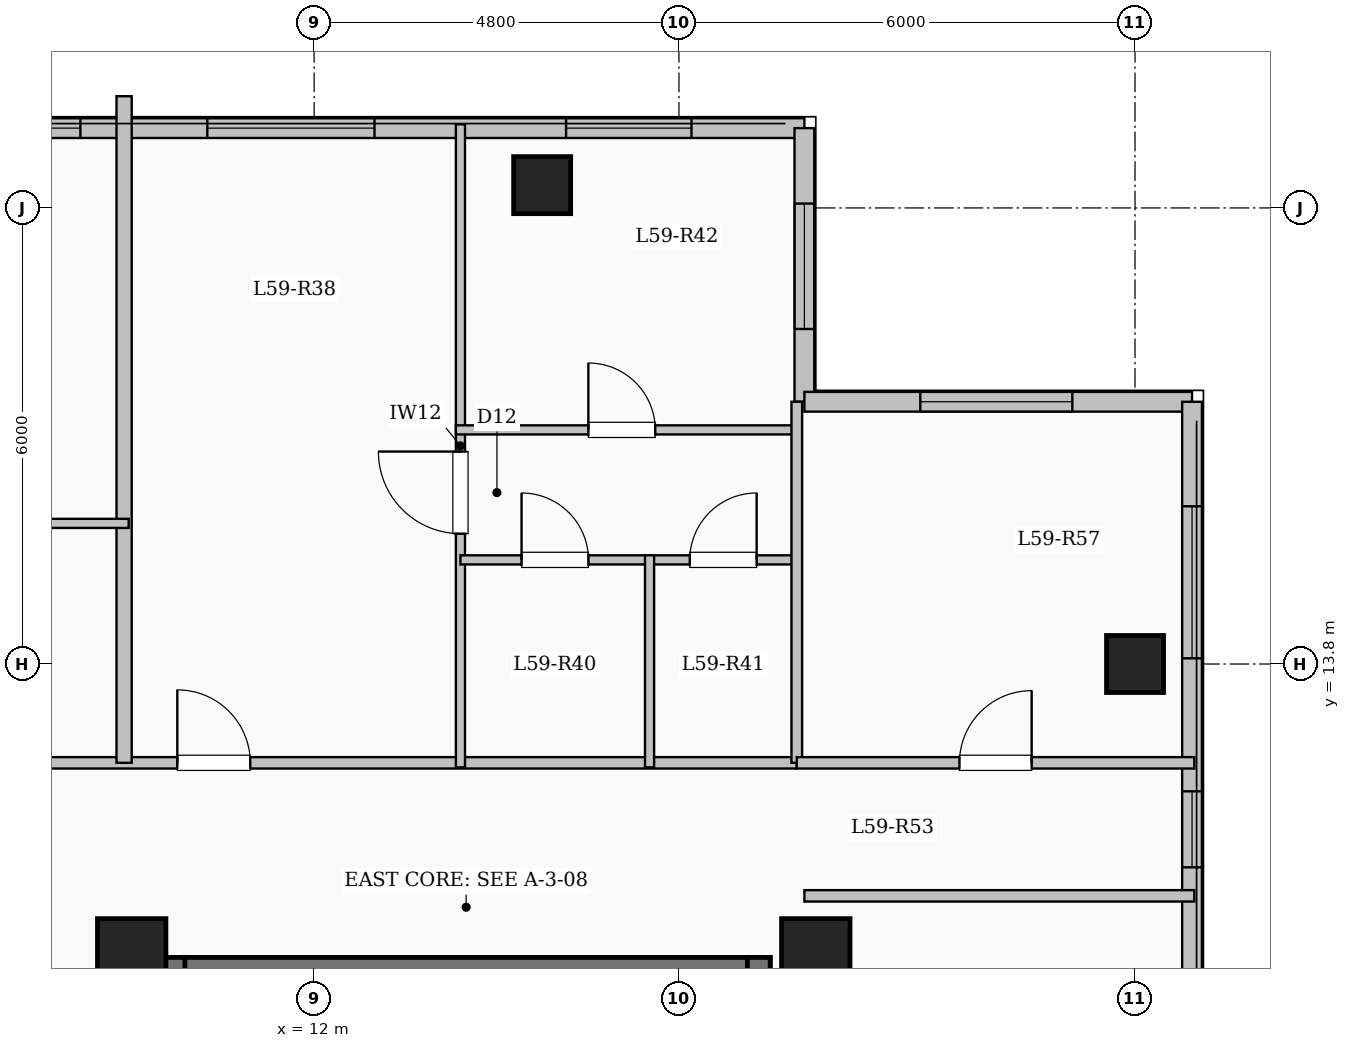
"""IFC4 building model, lengths in metres.
Left out: names, types, materials, properties, quantities, classifications, styles, units other than length and angle.
Written with IfcOpenShell. Run it as: python <this file> out.ifc"""

import sys

from ifc_helpers import new_model, si_unit, direction, frame, frame_2d, origin, origin_2d, place, context, subcontext, project, spatial, rectangle, extrude, element, fill, save


model = new_model("IFC4")
c1 = context("Model", 3, precision=1e-05, world=origin(), true_north=direction((0.0, 1.0)))
c2 = subcontext(c1, "Body", "Model", "MODEL_VIEW")
j1 = project(units=[si_unit("LENGTHUNIT", "METRE"), si_unit("PLANEANGLEUNIT", "RADIAN")], contexts=[c1])
p1 = place(None, origin())
s1 = spatial("IfcSite", under=j1, at=p1, CompositionType="ELEMENT")
p2 = place(p1, origin())
s2 = spatial("IfcBuilding", under=s1, at=p2, CompositionType="ELEMENT")
p3 = place(p2, frame((0.0, 0.0, 217.05)))
s3 = spatial("IfcBuildingStorey", under=s2, at=p3, CompositionType="ELEMENT", Elevation=217.05)
for number, where, z_axis, x_axis in (
    (1, (9.6, 10.0, 0.0), (0.0, 0.0, 1.0), (1.0, 0.0, 0.0)),
    (2, (18.6, 10.0, 0.0), (0.0, 0.0, 1.0), (1.0, 0.0, 0.0)),
):
    element("IfcColumn", number, at=place(p3, frame(where, z_axis=z_axis, x_axis=x_axis)), inside=s3, PredefinedType="COLUMN", context=c2, shape_type="SweptSolid", body=[
        extrude(rectangle(XDim=0.9, YDim=0.9, at=origin_2d()), origin(), (0.0, 0.0, 1.0), 3.35),
    ])
for number, where, z_axis, x_axis in (
    (3, (15.0, 20.1, 0.0), (0.0, 0.0, 1.0), (1.0, 0.0, 0.0)),
    (4, (22.8, 13.8, 0.0), (0.0, 0.0, 1.0), (1.0, 0.0, 0.0)),
):
    element("IfcColumn", number, at=place(p3, frame(where, z_axis=z_axis, x_axis=x_axis)), inside=s3, PredefinedType="COLUMN", context=c2, shape_type="SweptSolid", body=[
        extrude(rectangle(XDim=0.75, YDim=0.75, at=origin_2d()), origin(), (0.0, 0.0, 1.0), 3.35),
    ])
p4 = place(p3, frame((7.35, 20.85, 0.0), z_axis=(0.0, 0.0, 1.0), x_axis=(1.0, 0.0, 0.0)))
e5 = element("IfcWall", 5, at=p4, inside=s3, PredefinedType="SOLIDWALL", context=c2, shape_type="SweptSolid", body=[
    extrude(rectangle(XDim=11.1, YDim=0.26, at=frame_2d((5.55, 0.0))), origin(), (0.0, 0.0, 1.0), 3.1),
])
p5 = place(p4, frame((0.375, 0.0, 0.95)))
e6 = element("IfcOpeningElement", 6, at=p5, cuts=e5, PredefinedType="OPENING", context=c2, shape_type="SweptSolid", body=[
    extrude(rectangle(XDim=1.2, YDim=1.5, at=frame_2d((0.6, 0.75))), frame((0.0, 0.14, 0.0), z_axis=(0.0, -1.0, 0.0), x_axis=(1.0, 0.0, 0.0)), (0.0, 0.0, 1.0), 0.28),
])
p6 = place(p4, frame((3.245, 0.0, 0.9)))
e7 = element("IfcOpeningElement", 7, at=p6, cuts=e5, PredefinedType="OPENING", context=c2, shape_type="SweptSolid", body=[
    extrude(rectangle(XDim=2.2, YDim=1.75, at=frame_2d((1.1, 0.875))), frame((0.0, 0.14, 0.0), z_axis=(0.0, -1.0, 0.0), x_axis=(1.0, 0.0, 0.0)), (0.0, 0.0, 1.0), 0.28),
])
p7 = place(p4, frame((7.965, 0.0, 0.9)))
e8 = element("IfcOpeningElement", 8, at=p7, cuts=e5, PredefinedType="OPENING", context=c2, shape_type="SweptSolid", body=[
    extrude(rectangle(XDim=1.65, YDim=1.6, at=frame_2d((0.825, 0.8))), frame((0.0, 0.14, 0.0), z_axis=(0.0, -1.0, 0.0), x_axis=(1.0, 0.0, 0.0)), (0.0, 0.0, 1.0), 0.28),
])
p8 = place(p3, frame((18.45, 20.85, 0.0), z_axis=(0.0, 0.0, 1.0), x_axis=(0.0, -1.0, 0.0)))
e9 = element("IfcWall", 9, at=p8, inside=s3, PredefinedType="SOLIDWALL", context=c2, shape_type="SweptSolid", body=[
    extrude(rectangle(XDim=3.6, YDim=0.26, at=frame_2d((1.8, 0.0))), origin(), (0.0, 0.0, 1.0), 3.1),
])
p9 = place(p8, frame((0.992, 0.0, 0.9)))
e10 = element("IfcOpeningElement", 10, at=p9, cuts=e9, PredefinedType="OPENING", context=c2, shape_type="SweptSolid", body=[
    extrude(rectangle(XDim=1.65, YDim=1.6, at=frame_2d((0.825, 0.8))), frame((0.0, 0.14, 0.0), z_axis=(0.0, -1.0, 0.0), x_axis=(1.0, 0.0, 0.0)), (0.0, 0.0, 1.0), 0.28),
])
p10 = place(p3, frame((18.45, 17.25, 0.0), z_axis=(0.0, 0.0, 1.0), x_axis=(1.0, 0.0, 0.0)))
e11 = element("IfcWall", 11, at=p10, inside=s3, PredefinedType="SOLIDWALL", context=c2, shape_type="SweptSolid", body=[
    extrude(rectangle(XDim=5.1, YDim=0.26, at=frame_2d((2.55, 0.0))), origin(), (0.0, 0.0, 1.0), 3.1),
])
p11 = place(p10, frame((1.525, 0.0, 0.9)))
e12 = element("IfcOpeningElement", 12, at=p11, cuts=e11, PredefinedType="OPENING", context=c2, shape_type="SweptSolid", body=[
    extrude(rectangle(XDim=2.0, YDim=1.7, at=frame_2d((1.0, 0.85))), frame((0.0, 0.14, 0.0), z_axis=(0.0, -1.0, 0.0), x_axis=(1.0, 0.0, 0.0)), (0.0, 0.0, 1.0), 0.28),
])
p12 = place(p3, frame((23.55, 17.25, 0.0), z_axis=(0.0, 0.0, 1.0), x_axis=(0.0, -1.0, 0.0)))
e13 = element("IfcWall", 13, at=p12, inside=s3, PredefinedType="SOLIDWALL", context=c2, shape_type="SweptSolid", body=[
    extrude(rectangle(XDim=34.5, YDim=0.26, at=frame_2d((17.25, 0.0))), origin(), (0.0, 0.0, 1.0), 3.1),
])
p13 = place(p12, frame((1.375, 0.0, 0.9)))
e14 = element("IfcOpeningElement", 14, at=p13, cuts=e13, PredefinedType="OPENING", context=c2, shape_type="SweptSolid", body=[
    extrude(rectangle(XDim=2.0, YDim=1.7, at=frame_2d((1.0, 0.85))), frame((0.0, 0.14, 0.0), z_axis=(0.0, -1.0, 0.0), x_axis=(1.0, 0.0, 0.0)), (0.0, 0.0, 1.0), 0.28),
])
p14 = place(p12, frame((5.125, 0.0, 0.95)))
e15 = element("IfcOpeningElement", 15, at=p14, cuts=e13, PredefinedType="OPENING", context=c2, shape_type="SweptSolid", body=[
    extrude(rectangle(XDim=1.0, YDim=1.5, at=frame_2d((0.5, 0.75))), frame((0.0, 0.14, 0.0), z_axis=(0.0, -1.0, 0.0), x_axis=(1.0, 0.0, 0.0)), (0.0, 0.0, 1.0), 0.28),
])
p15 = place(p12, frame((14.5, 0.0, 0.9)))
e16 = element("IfcOpeningElement", 16, at=p15, cuts=e13, PredefinedType="OPENING", context=c2, shape_type="SweptSolid", body=[
    extrude(rectangle(XDim=2.0, YDim=1.7, at=frame_2d((1.0, 0.85))), frame((0.0, 0.14, 0.0), z_axis=(0.0, -1.0, 0.0), x_axis=(1.0, 0.0, 0.0)), (0.0, 0.0, 1.0), 0.28),
])
p16 = place(p12, frame((24.975, 0.0, 0.95)))
e17 = element("IfcOpeningElement", 17, at=p16, cuts=e13, PredefinedType="OPENING", context=c2, shape_type="SweptSolid", body=[
    extrude(rectangle(XDim=1.2, YDim=1.5, at=frame_2d((0.6, 0.75))), frame((0.0, 0.14, 0.0), z_axis=(0.0, -1.0, 0.0), x_axis=(1.0, 0.0, 0.0)), (0.0, 0.0, 1.0), 0.28),
])
p17 = place(p12, frame((29.475, 0.0, 0.9)))
e18 = element("IfcOpeningElement", 18, at=p17, cuts=e13, PredefinedType="OPENING", context=c2, shape_type="SweptSolid", body=[
    extrude(rectangle(XDim=2.2, YDim=1.75, at=frame_2d((1.1, 0.875))), frame((0.0, 0.14, 0.0), z_axis=(0.0, -1.0, 0.0), x_axis=(1.0, 0.0, 0.0)), (0.0, 0.0, 1.0), 0.28),
])
p18 = place(p3, frame((10.0, 9.79, 0.0), z_axis=(0.0, 0.0, 1.0), x_axis=(1.0, 0.0, 0.0)))
e19 = element("IfcWall", 19, at=p18, inside=s3, PredefinedType="SHEAR", context=c2, shape_type="SweptSolid", body=[
    extrude(rectangle(XDim=8.0, YDim=0.3, at=frame_2d((4.0, 0.0))), origin(), (0.0, 0.0, 1.0), 3.35),
])
for number, where, z_axis, x_axis in (
    (20, (10.15, 6.35, 0.0), (0.0, 0.0, 1.0), (0.0, 1.0, 0.0)),
    (21, (17.85, 6.35, 0.0), (0.0, 0.0, 1.0), (0.0, 1.0, 0.0)),
):
    element("IfcWall", number, at=place(p3, frame(where, z_axis=z_axis, x_axis=x_axis)), inside=s3, PredefinedType="SHEAR", context=c2, shape_type="SweptSolid", body=[
        extrude(rectangle(XDim=3.59, YDim=0.3, at=frame_2d((1.795, 0.0))), origin(), (0.0, 0.0, 1.0), 3.35),
    ])
p19 = place(p3, frame((3.85, 12.5, 0.0), z_axis=(0.0, 0.0, 1.0), x_axis=(1.0, 0.0, 0.0)))
e22 = element("IfcWall", 22, at=p19, inside=s3, PredefinedType="PARTITIONING", context=c2, shape_type="SweptSolid", body=[
    extrude(rectangle(XDim=14.5, YDim=0.15, at=frame_2d((7.25, 0.0))), origin(), (0.0, 0.0, 1.0), 3.1),
])
p20 = place(p19, frame((1.45, 0.0, 0.0)))
e23 = element("IfcOpeningElement", 23, at=p20, cuts=e22, PredefinedType="OPENING", context=c2, shape_type="SweptSolid", body=[
    extrude(rectangle(XDim=0.96, YDim=2.15, at=frame_2d((0.48, 1.075))), frame((0.0, 0.085, 0.0), z_axis=(0.0, -1.0, 0.0), x_axis=(1.0, 0.0, 0.0)), (0.0, 0.0, 1.0), 0.17),
])
p21 = place(p19, frame((6.35, 0.0, 0.0)))
e24 = element("IfcOpeningElement", 24, at=p21, cuts=e22, PredefinedType="OPENING", context=c2, shape_type="SweptSolid", body=[
    extrude(rectangle(XDim=0.96, YDim=2.15, at=frame_2d((0.48, 1.075))), frame((0.0, 0.085, 0.0), z_axis=(0.0, -1.0, 0.0), x_axis=(1.0, 0.0, 0.0)), (0.0, 0.0, 1.0), 0.17),
])
p22 = place(p3, frame((9.5, 12.5, 0.0), z_axis=(0.0, 0.0, 1.0), x_axis=(0.0, 1.0, 0.0)))
e25 = element("IfcWall", 25, at=p22, inside=s3, PredefinedType="SOLIDWALL", context=c2, shape_type="SweptSolid", body=[
    extrude(rectangle(XDim=8.77, YDim=0.2, at=frame_2d((4.385, 0.0))), origin(), (0.0, 0.0, 1.0), 3.1),
])
p23 = place(p3, frame((4.965, 15.65, 0.0), z_axis=(0.0, 0.0, 1.0), x_axis=(1.0, 0.0, 0.0)))
e26 = element("IfcWall", 26, at=p23, inside=s3, PredefinedType="PARTITIONING", context=c2, shape_type="SweptSolid", body=[
    extrude(rectangle(XDim=4.595, YDim=0.12, at=frame_2d((2.297, 0.0))), origin(), (0.0, 0.0, 1.0), 2.725),
])
p24 = place(p3, frame((13.925, 12.44, 0.0), z_axis=(0.0, 0.0, 1.0), x_axis=(0.0, 1.0, 0.0)))
e27 = element("IfcWall", 27, at=p24, inside=s3, PredefinedType="PARTITIONING", context=c2, shape_type="SweptSolid", body=[
    extrude(rectangle(XDim=8.46, YDim=0.12, at=frame_2d((4.23, 0.0))), origin(), (0.0, 0.0, 1.0), 3.1),
])
p25 = place(p24, frame((3.075, 0.0, 0.0)))
e28 = element("IfcOpeningElement", 28, at=p25, cuts=e27, PredefinedType="OPENING", context=c2, shape_type="SweptSolid", body=[
    extrude(rectangle(XDim=1.08, YDim=2.15, at=frame_2d((0.54, 1.075))), frame((0.0, 0.07, 0.0), z_axis=(0.0, -1.0, 0.0), x_axis=(1.0, 0.0, 0.0)), (0.0, 0.0, 1.0), 0.14),
])
p26 = place(p3, frame((13.925, 15.17, 0.0), z_axis=(0.0, 0.0, 1.0), x_axis=(1.0, 0.0, 0.0)))
e29 = element("IfcWall", 29, at=p26, inside=s3, PredefinedType="PARTITIONING", context=c2, shape_type="SweptSolid", body=[
    extrude(rectangle(XDim=2.488, YDim=0.12, at=frame_2d((1.244, 0.0))), origin(), (0.0, 0.0, 1.0), 3.1),
])
p27 = place(p26, frame((0.804, 0.0, 0.0)))
e30 = element("IfcOpeningElement", 30, at=p27, cuts=e29, PredefinedType="OPENING", context=c2, shape_type="SweptSolid", body=[
    extrude(rectangle(XDim=0.88, YDim=2.1, at=frame_2d((0.44, 1.05))), frame((0.0, 0.07, 0.0), z_axis=(0.0, -1.0, 0.0), x_axis=(1.0, 0.0, 0.0)), (0.0, 0.0, 1.0), 0.14),
])
p28 = place(p3, frame((16.413, 15.17, 0.0), z_axis=(0.0, 0.0, 1.0), x_axis=(1.0, 0.0, 0.0)))
e31 = element("IfcWall", 31, at=p28, inside=s3, PredefinedType="PARTITIONING", context=c2, shape_type="SweptSolid", body=[
    extrude(rectangle(XDim=1.937, YDim=0.12, at=frame_2d((0.969, 0.0))), origin(), (0.0, 0.0, 1.0), 3.1),
])
p29 = place(p28, frame((0.529, 0.0, 0.0)))
e32 = element("IfcOpeningElement", 32, at=p29, cuts=e31, PredefinedType="OPENING", context=c2, shape_type="SweptSolid", body=[
    extrude(rectangle(XDim=0.88, YDim=2.1, at=frame_2d((0.44, 1.05))), frame((0.0, 0.07, 0.0), z_axis=(0.0, -1.0, 0.0), x_axis=(1.0, 0.0, 0.0)), (0.0, 0.0, 1.0), 0.14),
])
p30 = place(p3, frame((13.865, 16.88, 0.0), z_axis=(0.0, 0.0, 1.0), x_axis=(1.0, 0.0, 0.0)))
e33 = element("IfcWall", 33, at=p30, inside=s3, PredefinedType="PARTITIONING", context=c2, shape_type="SweptSolid", body=[
    extrude(rectangle(XDim=4.545, YDim=0.12, at=frame_2d((2.272, 0.0))), origin(), (0.0, 0.0, 1.0), 2.725),
])
p31 = place(p30, frame((1.743, 0.0, 0.0)))
e34 = element("IfcOpeningElement", 34, at=p31, cuts=e33, PredefinedType="OPENING", context=c2, shape_type="SweptSolid", body=[
    extrude(rectangle(XDim=0.88, YDim=2.1, at=frame_2d((0.44, 1.05))), frame((0.0, 0.07, 0.0), z_axis=(0.0, -1.0, 0.0), x_axis=(1.0, 0.0, 0.0)), (0.0, 0.0, 1.0), 0.14),
])
p32 = place(p3, frame((16.413, 12.44, 0.0), z_axis=(0.0, 0.0, 1.0), x_axis=(0.0, 1.0, 0.0)))
e35 = element("IfcWall", 35, at=p32, inside=s3, PredefinedType="PARTITIONING", context=c2, shape_type="SweptSolid", body=[
    extrude(rectangle(XDim=2.79, YDim=0.12, at=frame_2d((1.395, 0.0))), origin(), (0.0, 0.0, 1.0), 3.1),
])
p33 = place(p3, frame((18.45, 10.75, 0.0), z_axis=(0.0, 0.0, 1.0), x_axis=(1.0, 0.0, 0.0)))
e36 = element("IfcWall", 36, at=p33, inside=s3, PredefinedType="PARTITIONING", context=c2, shape_type="SweptSolid", body=[
    extrude(rectangle(XDim=5.13, YDim=0.15, at=frame_2d((2.565, 0.0))), origin(), (0.0, 0.0, 1.0), 3.1),
])
p34 = place(p3, frame((18.35, 12.5, 0.0), z_axis=(0.0, 0.0, 1.0), x_axis=(0.0, 1.0, 0.0)))
e37 = element("IfcWall", 37, at=p34, inside=s3, PredefinedType="PARTITIONING", context=c2, shape_type="SweptSolid", body=[
    extrude(rectangle(XDim=4.75, YDim=0.14, at=frame_2d((2.375, 0.0))), origin(), (0.0, 0.0, 1.0), 3.1),
])
p35 = place(p3, frame((18.35, 12.5, 0.0), z_axis=(0.0, 0.0, 1.0), x_axis=(1.0, 0.0, 0.0)))
e38 = element("IfcWall", 38, at=p35, inside=s3, PredefinedType="PARTITIONING", context=c2, shape_type="SweptSolid", body=[
    extrude(rectangle(XDim=5.23, YDim=0.15, at=frame_2d((2.615, 0.0))), origin(), (0.0, 0.0, 1.0), 3.1),
])
p36 = place(p35, frame((2.14, 0.0, 0.0)))
e39 = element("IfcOpeningElement", 39, at=p36, cuts=e38, PredefinedType="OPENING", context=c2, shape_type="SweptSolid", body=[
    extrude(rectangle(XDim=0.95, YDim=2.15, at=frame_2d((0.475, 1.075))), frame((0.0, 0.085, 0.0), z_axis=(0.0, -1.0, 0.0), x_axis=(1.0, 0.0, 0.0)), (0.0, 0.0, 1.0), 0.17),
])
p37 = place(p5, origin())
e40 = element("IfcWindow", 40, at=p37, inside=s3, PartitioningType="SINGLE_PANEL", PredefinedType="WINDOW", context=c2, shape_type="SweptSolid", body=[
    extrude(rectangle(XDim=1.2, YDim=1.5, at=frame_2d((0.6, 0.75))), frame((0.0, 0.03, 0.0), z_axis=(0.0, -1.0, 0.0), x_axis=(1.0, 0.0, 0.0)), (0.0, 0.0, 1.0), 0.06),
])
fill(e6, e40)
p38 = place(p6, origin())
e41 = element("IfcWindow", 41, at=p38, inside=s3, PartitioningType="SINGLE_PANEL", PredefinedType="WINDOW", context=c2, shape_type="SweptSolid", body=[
    extrude(rectangle(XDim=2.2, YDim=1.75, at=frame_2d((1.1, 0.875))), frame((0.0, 0.03, 0.0), z_axis=(0.0, -1.0, 0.0), x_axis=(1.0, 0.0, 0.0)), (0.0, 0.0, 1.0), 0.06),
])
fill(e7, e41)
p39 = place(p7, origin())
e42 = element("IfcWindow", 42, at=p39, inside=s3, PartitioningType="SINGLE_PANEL", PredefinedType="WINDOW", context=c2, shape_type="SweptSolid", body=[
    extrude(rectangle(XDim=1.65, YDim=1.6, at=frame_2d((0.825, 0.8))), frame((0.0, 0.03, 0.0), z_axis=(0.0, -1.0, 0.0), x_axis=(1.0, 0.0, 0.0)), (0.0, 0.0, 1.0), 0.06),
])
fill(e8, e42)
p40 = place(p9, origin())
e43 = element("IfcWindow", 43, at=p40, inside=s3, PartitioningType="SINGLE_PANEL", PredefinedType="WINDOW", context=c2, shape_type="SweptSolid", body=[
    extrude(rectangle(XDim=1.65, YDim=1.6, at=frame_2d((0.825, 0.8))), frame((0.0, 0.03, 0.0), z_axis=(0.0, -1.0, 0.0), x_axis=(1.0, 0.0, 0.0)), (0.0, 0.0, 1.0), 0.06),
])
fill(e10, e43)
p41 = place(p11, origin())
e44 = element("IfcWindow", 44, at=p41, inside=s3, PartitioningType="SINGLE_PANEL", PredefinedType="WINDOW", context=c2, shape_type="SweptSolid", body=[
    extrude(rectangle(XDim=2.0, YDim=1.7, at=frame_2d((1.0, 0.85))), frame((0.0, 0.03, 0.0), z_axis=(0.0, -1.0, 0.0), x_axis=(1.0, 0.0, 0.0)), (0.0, 0.0, 1.0), 0.06),
])
fill(e12, e44)
p42 = place(p13, origin())
e45 = element("IfcWindow", 45, at=p42, inside=s3, PartitioningType="SINGLE_PANEL", PredefinedType="WINDOW", context=c2, shape_type="SweptSolid", body=[
    extrude(rectangle(XDim=2.0, YDim=1.7, at=frame_2d((1.0, 0.85))), frame((0.0, 0.03, 0.0), z_axis=(0.0, -1.0, 0.0), x_axis=(1.0, 0.0, 0.0)), (0.0, 0.0, 1.0), 0.06),
])
fill(e14, e45)
p43 = place(p14, origin())
e46 = element("IfcWindow", 46, at=p43, inside=s3, PartitioningType="SINGLE_PANEL", PredefinedType="WINDOW", context=c2, shape_type="SweptSolid", body=[
    extrude(rectangle(XDim=1.0, YDim=1.5, at=frame_2d((0.5, 0.75))), frame((0.0, 0.03, 0.0), z_axis=(0.0, -1.0, 0.0), x_axis=(1.0, 0.0, 0.0)), (0.0, 0.0, 1.0), 0.06),
])
fill(e15, e46)
p44 = place(p21, origin())
e47 = element("IfcDoor", 47, at=p44, inside=s3, OperationType="SINGLE_SWING_LEFT", PredefinedType="DOOR", context=c2, shape_type="SweptSolid", body=[
    extrude(rectangle(XDim=0.96, YDim=2.15, at=frame_2d((0.48, 1.075))), frame((0.0, 0.025, 0.0), z_axis=(0.0, -1.0, 0.0), x_axis=(1.0, 0.0, 0.0)), (0.0, 0.0, 1.0), 0.05),
])
fill(e24, e47)
p45 = place(p25, origin())
e48 = element("IfcDoor", 48, at=p45, inside=s3, OperationType="SINGLE_SWING_RIGHT", PredefinedType="DOOR", context=c2, shape_type="SweptSolid", body=[
    extrude(rectangle(XDim=1.08, YDim=2.15, at=frame_2d((0.54, 1.075))), frame((0.0, 0.025, 0.0), z_axis=(0.0, -1.0, 0.0), x_axis=(1.0, 0.0, 0.0)), (0.0, 0.0, 1.0), 0.05),
])
fill(e28, e48)
p46 = place(p27, origin())
e49 = element("IfcDoor", 49, at=p46, inside=s3, OperationType="SINGLE_SWING_LEFT", PredefinedType="DOOR", context=c2, shape_type="SweptSolid", body=[
    extrude(rectangle(XDim=0.88, YDim=2.1, at=frame_2d((0.44, 1.05))), frame((0.0, 0.025, 0.0), z_axis=(0.0, -1.0, 0.0), x_axis=(1.0, 0.0, 0.0)), (0.0, 0.0, 1.0), 0.05),
])
fill(e30, e49)
p47 = place(p29, origin())
e50 = element("IfcDoor", 50, at=p47, inside=s3, OperationType="SINGLE_SWING_RIGHT", PredefinedType="DOOR", context=c2, shape_type="SweptSolid", body=[
    extrude(rectangle(XDim=0.88, YDim=2.1, at=frame_2d((0.44, 1.05))), frame((0.0, 0.025, 0.0), z_axis=(0.0, -1.0, 0.0), x_axis=(1.0, 0.0, 0.0)), (0.0, 0.0, 1.0), 0.05),
])
fill(e32, e50)
p48 = place(p31, origin())
e51 = element("IfcDoor", 51, at=p48, inside=s3, OperationType="SINGLE_SWING_LEFT", PredefinedType="DOOR", context=c2, shape_type="SweptSolid", body=[
    extrude(rectangle(XDim=0.88, YDim=2.1, at=frame_2d((0.44, 1.05))), frame((0.0, 0.025, 0.0), z_axis=(0.0, -1.0, 0.0), x_axis=(1.0, 0.0, 0.0)), (0.0, 0.0, 1.0), 0.05),
])
fill(e34, e51)
p49 = place(p36, origin())
e52 = element("IfcDoor", 52, at=p49, inside=s3, OperationType="SINGLE_SWING_RIGHT", PredefinedType="DOOR", context=c2, shape_type="SweptSolid", body=[
    extrude(rectangle(XDim=0.95, YDim=2.15, at=frame_2d((0.475, 1.075))), frame((0.0, 0.025, 0.0), z_axis=(0.0, -1.0, 0.0), x_axis=(1.0, 0.0, 0.0)), (0.0, 0.0, 1.0), 0.05),
])
fill(e39, e52)
save(model, sys.argv[1])
